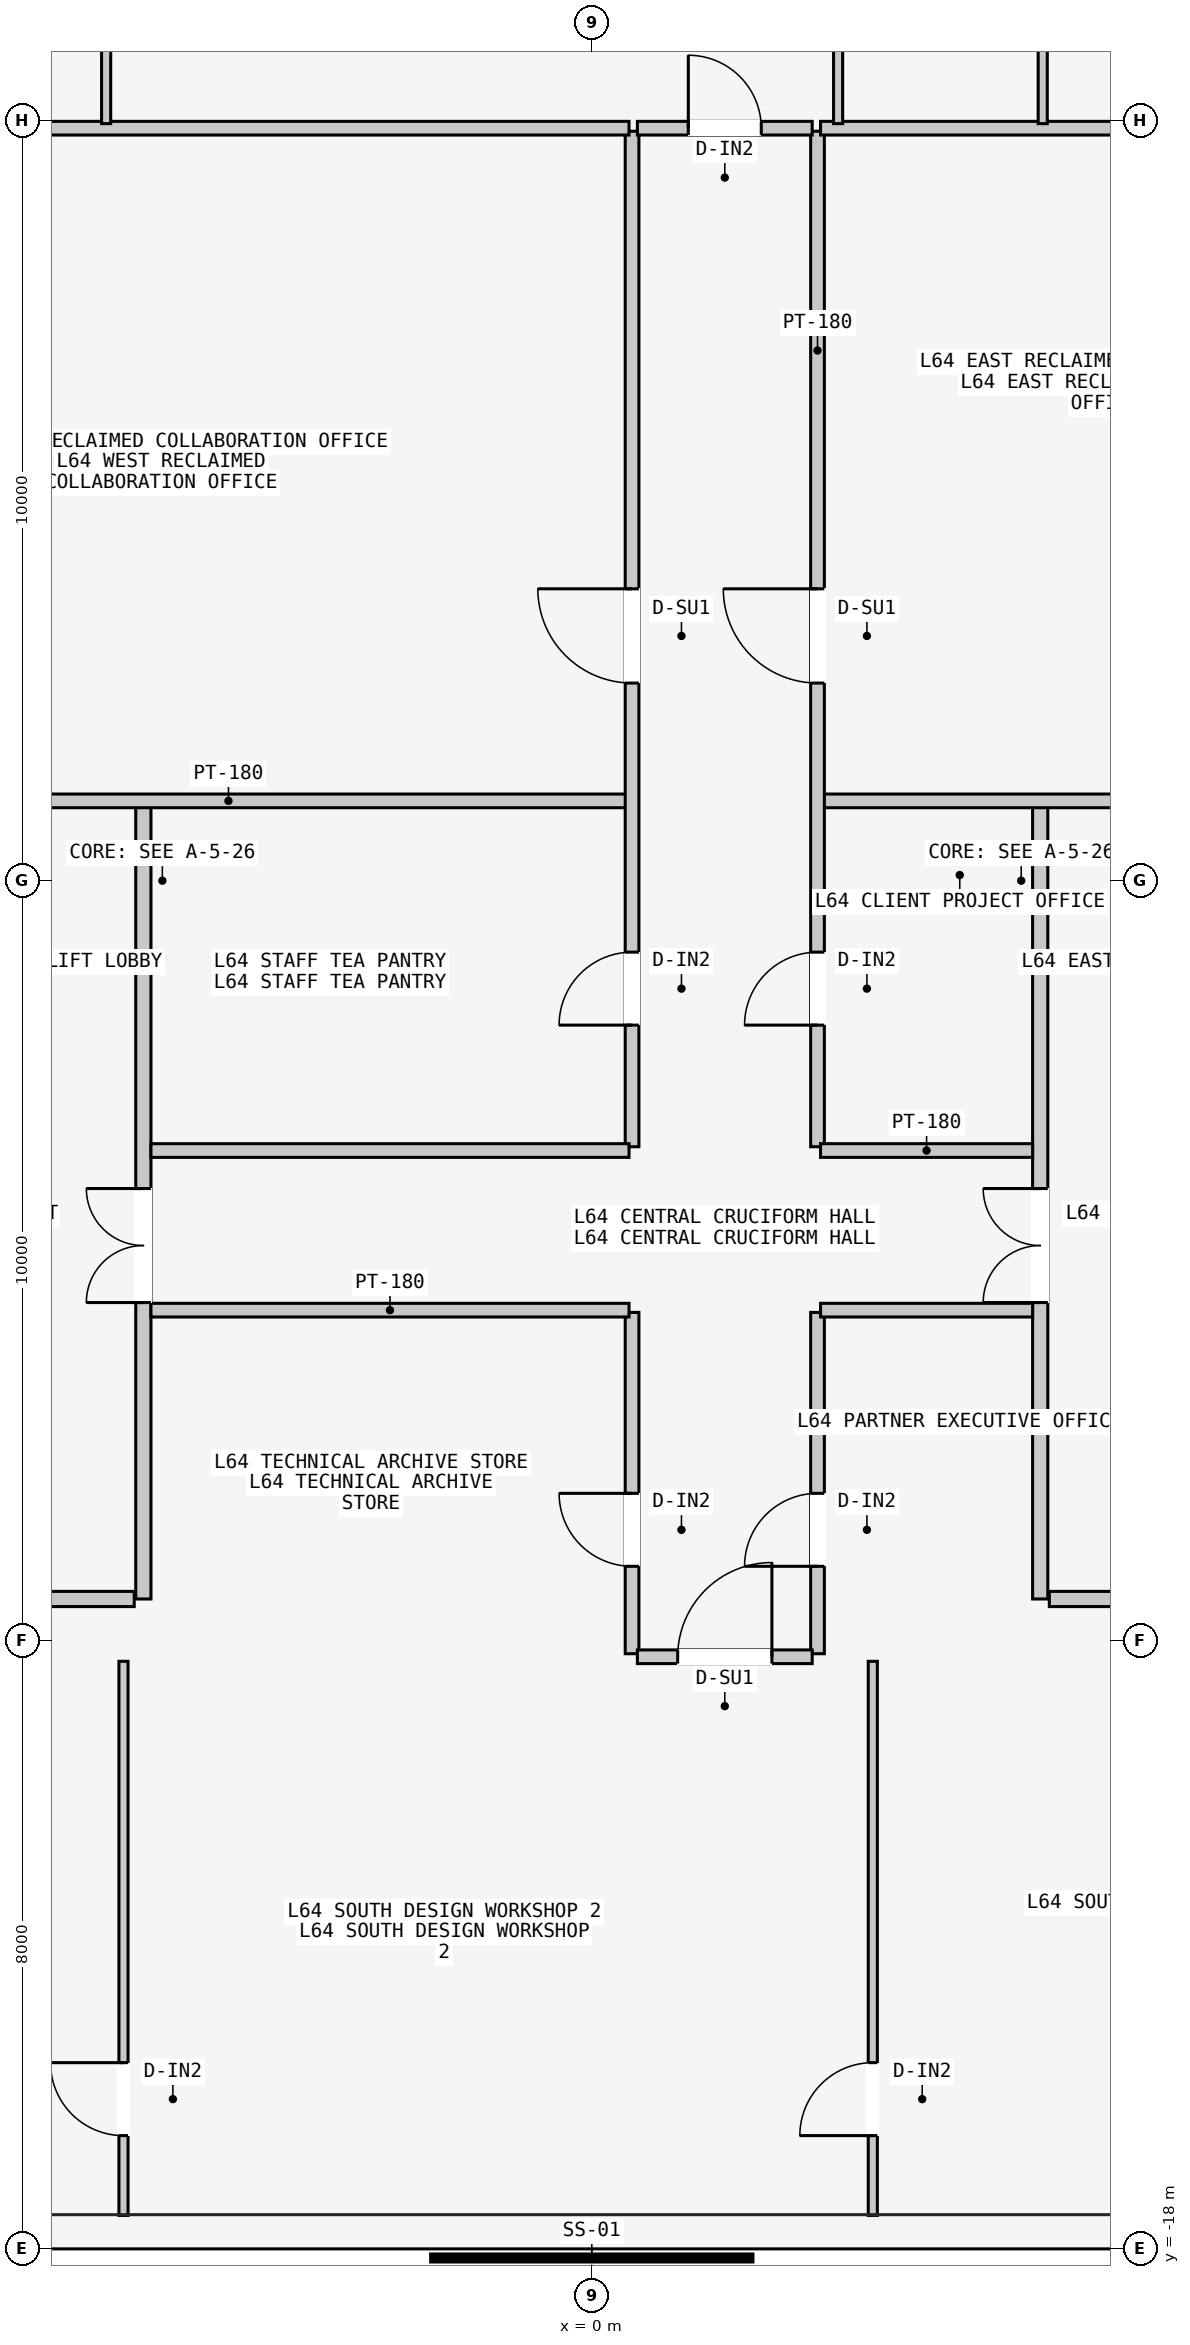
"""IFC4 building model, lengths in metres.
Left out: names, types, materials, properties, quantities, classifications, styles, units other than length and angle.
Written with IfcOpenShell. Run it as: python <this file> out.ifc"""

import sys

from ifc_helpers import new_model, si_unit, direction, frame, frame_2d, origin, place, context, subcontext, project, spatial, rectangle, extrude, element, fill, save


model = new_model("IFC4")
c1 = context("Model", 3, precision=1e-05, world=origin(), true_north=direction((0.0, 1.0)))
c2 = subcontext(c1, "Body", "Model", "MODEL_VIEW")
j1 = project(units=[si_unit("LENGTHUNIT", "METRE"), si_unit("PLANEANGLEUNIT", "RADIAN")], contexts=[c1])
p1 = place(None, origin())
s1 = spatial("IfcSite", under=j1, at=p1, CompositionType="ELEMENT")
p2 = place(p1, origin())
s2 = spatial("IfcBuilding", under=s1, at=p2, CompositionType="ELEMENT")
p3 = place(p2, frame((0.0, 0.0, 243.6)))
s3 = spatial("IfcBuildingStorey", under=s2, at=p3, CompositionType="ELEMENT", Elevation=243.6)
p4 = place(p3, frame((-5.9, -9.45, 0.0), z_axis=(0.0, 0.0, 1.0), x_axis=(0.0, 1.0, 0.0)))
e1 = element("IfcWall", 1, at=p4, inside=s3, PredefinedType="PARTITIONING", context=c2, shape_type="SweptSolid", body=[
    extrude(rectangle(XDim=10.5, YDim=0.2, at=frame_2d((5.25, 0.0))), origin(), (0.0, 0.0, 1.0), 3.4),
])
p5 = place(p4, frame((3.9, 0.0, 0.0)))
e2 = element("IfcOpeningElement", 2, at=p5, cuts=e1, PredefinedType="OPENING", context=c2, shape_type="SweptSolid", body=[
    extrude(rectangle(XDim=1.5, YDim=2.2, at=frame_2d((0.75, 1.1))), frame((0.0, 0.11, 0.0), z_axis=(0.0, -1.0, 0.0), x_axis=(1.0, 0.0, 0.0)), (0.0, 0.0, 1.0), 0.22),
])
p6 = place(p3, frame((-6.02, -9.45, 0.0), z_axis=(0.0, 0.0, 1.0), x_axis=(-1.0, 0.0, 0.0)))
e3 = element("IfcWall", 3, at=p6, inside=s3, PredefinedType="PARTITIONING", context=c2, shape_type="SweptSolid", body=[
    extrude(rectangle(XDim=1.8, YDim=0.2, at=frame_2d((0.9, 0.0))), origin(), (0.0, 0.0, 1.0), 3.4),
])
p7 = place(p3, frame((5.9, -9.45, 0.0), z_axis=(0.0, 0.0, 1.0), x_axis=(0.0, 1.0, 0.0)))
e4 = element("IfcWall", 4, at=p7, inside=s3, PredefinedType="PARTITIONING", context=c2, shape_type="SweptSolid", body=[
    extrude(rectangle(XDim=10.5, YDim=0.2, at=frame_2d((5.25, 0.0))), origin(), (0.0, 0.0, 1.0), 3.4),
])
p8 = place(p7, frame((3.9, 0.0, 0.0)))
e5 = element("IfcOpeningElement", 5, at=p8, cuts=e4, PredefinedType="OPENING", context=c2, shape_type="SweptSolid", body=[
    extrude(rectangle(XDim=1.5, YDim=2.2, at=frame_2d((0.75, 1.1))), frame((0.0, 0.11, 0.0), z_axis=(0.0, -1.0, 0.0), x_axis=(1.0, 0.0, 0.0)), (0.0, 0.0, 1.0), 0.22),
])
p9 = place(p3, frame((6.02, -9.45, 0.0), z_axis=(0.0, 0.0, 1.0), x_axis=(1.0, 0.0, 0.0)))
e6 = element("IfcWall", 6, at=p9, inside=s3, PredefinedType="PARTITIONING", context=c2, shape_type="SweptSolid", body=[
    extrude(rectangle(XDim=1.8, YDim=0.2, at=frame_2d((0.9, 0.0))), origin(), (0.0, 0.0, 1.0), 3.4),
])
p10 = place(p3, frame((-10.05, 1.05, 0.0), z_axis=(0.0, 0.0, 1.0), x_axis=(1.0, 0.0, 0.0)))
e7 = element("IfcWall", 7, at=p10, inside=s3, PredefinedType="PARTITIONING", context=c2, shape_type="SweptSolid", body=[
    extrude(rectangle(XDim=10.54, YDim=0.18, at=frame_2d((5.27, 0.0))), origin(), (0.0, 0.0, 1.0), 3.4),
])
p11 = place(p3, frame((0.53, -3.5, 0.0), z_axis=(0.0, 0.0, 1.0), x_axis=(0.0, 1.0, 0.0)))
e8 = element("IfcWall", 8, at=p11, inside=s3, PredefinedType="PARTITIONING", context=c2, shape_type="SweptSolid", body=[
    extrude(rectangle(XDim=13.36, YDim=0.18, at=frame_2d((6.68, 0.0))), origin(), (0.0, 0.0, 1.0), 3.4),
])
p12 = place(p11, frame((6.1, 0.0, 0.0)))
e9 = element("IfcOpeningElement", 9, at=p12, cuts=e8, PredefinedType="OPENING", context=c2, shape_type="SweptSolid", body=[
    extrude(rectangle(XDim=1.24, YDim=2.24, at=frame_2d((0.62, 1.12))), frame((0.0, 0.1, 0.0), z_axis=(0.0, -1.0, 0.0), x_axis=(1.0, 0.0, 0.0)), (0.0, 0.0, 1.0), 0.2),
])
p13 = place(p11, frame((1.6, 0.0, 0.0)))
e10 = element("IfcOpeningElement", 10, at=p13, cuts=e8, PredefinedType="OPENING", context=c2, shape_type="SweptSolid", body=[
    extrude(rectangle(XDim=0.96, YDim=2.18, at=frame_2d((0.48, 1.09))), frame((0.0, 0.1, 0.0), z_axis=(0.0, -1.0, 0.0), x_axis=(1.0, 0.0, 0.0)), (0.0, 0.0, 1.0), 0.2),
])
p14 = place(p3, frame((-7.5, 9.9, 0.0), z_axis=(0.0, 0.0, 1.0), x_axis=(1.0, 0.0, 0.0)))
e11 = element("IfcWall", 11, at=p14, inside=s3, PredefinedType="PARTITIONING", context=c2, shape_type="SweptSolid", body=[
    extrude(rectangle(XDim=7.99, YDim=0.18, at=frame_2d((3.995, 0.0))), origin(), (0.0, 0.0, 1.0), 3.4),
])
p15 = place(p3, frame((-5.8, -3.55, 0.0), z_axis=(0.0, 0.0, 1.0), x_axis=(1.0, 0.0, 0.0)))
e12 = element("IfcWall", 12, at=p15, inside=s3, PredefinedType="PARTITIONING", context=c2, shape_type="SweptSolid", body=[
    extrude(rectangle(XDim=6.29, YDim=0.18, at=frame_2d((3.145, 0.0))), origin(), (0.0, 0.0, 1.0), 3.4),
])
p16 = place(p3, frame((3.01, 1.05, 0.0), z_axis=(0.0, 0.0, 1.0), x_axis=(1.0, 0.0, 0.0)))
e13 = element("IfcWall", 13, at=p16, inside=s3, PredefinedType="PARTITIONING", context=c2, shape_type="SweptSolid", body=[
    extrude(rectangle(XDim=7.05, YDim=0.18, at=frame_2d((3.525, 0.0))), origin(), (0.0, 0.0, 1.0), 3.4),
])
p17 = place(p3, frame((2.97, -3.5, 0.0), z_axis=(0.0, 0.0, 1.0), x_axis=(0.0, 1.0, 0.0)))
e14 = element("IfcWall", 14, at=p17, inside=s3, PredefinedType="PARTITIONING", context=c2, shape_type="SweptSolid", body=[
    extrude(rectangle(XDim=13.36, YDim=0.18, at=frame_2d((6.68, 0.0))), origin(), (0.0, 0.0, 1.0), 3.4),
])
p18 = place(p17, frame((6.1, 0.0, 0.0)))
e15 = element("IfcOpeningElement", 15, at=p18, cuts=e14, PredefinedType="OPENING", context=c2, shape_type="SweptSolid", body=[
    extrude(rectangle(XDim=1.24, YDim=2.24, at=frame_2d((0.62, 1.12))), frame((0.0, 0.1, 0.0), z_axis=(0.0, -1.0, 0.0), x_axis=(1.0, 0.0, 0.0)), (0.0, 0.0, 1.0), 0.2),
])
p19 = place(p17, frame((1.6, 0.0, 0.0)))
e16 = element("IfcOpeningElement", 16, at=p19, cuts=e14, PredefinedType="OPENING", context=c2, shape_type="SweptSolid", body=[
    extrude(rectangle(XDim=0.96, YDim=2.18, at=frame_2d((0.48, 1.09))), frame((0.0, 0.1, 0.0), z_axis=(0.0, -1.0, 0.0), x_axis=(1.0, 0.0, 0.0)), (0.0, 0.0, 1.0), 0.2),
])
p20 = place(p3, frame((3.01, 9.9, 0.0), z_axis=(0.0, 0.0, 1.0), x_axis=(1.0, 0.0, 0.0)))
e17 = element("IfcWall", 17, at=p20, inside=s3, PredefinedType="PARTITIONING", context=c2, shape_type="SweptSolid", body=[
    extrude(rectangle(XDim=4.49, YDim=0.18, at=frame_2d((2.245, 0.0))), origin(), (0.0, 0.0, 1.0), 3.4),
])
p21 = place(p3, frame((3.01, -3.55, 0.0), z_axis=(0.0, 0.0, 1.0), x_axis=(1.0, 0.0, 0.0)))
e18 = element("IfcWall", 18, at=p21, inside=s3, PredefinedType="PARTITIONING", context=c2, shape_type="SweptSolid", body=[
    extrude(rectangle(XDim=2.79, YDim=0.18, at=frame_2d((1.395, 0.0))), origin(), (0.0, 0.0, 1.0), 3.4),
])
p22 = place(p3, frame((0.53, -10.17, 0.0), z_axis=(0.0, 0.0, 1.0), x_axis=(0.0, 1.0, 0.0)))
e19 = element("IfcWall", 19, at=p22, inside=s3, PredefinedType="PARTITIONING", context=c2, shape_type="SweptSolid", body=[
    extrude(rectangle(XDim=4.49, YDim=0.18, at=frame_2d((2.245, 0.0))), origin(), (0.0, 0.0, 1.0), 3.4),
])
p23 = place(p22, frame((1.15, 0.0, 0.0)))
e20 = element("IfcOpeningElement", 20, at=p23, cuts=e19, PredefinedType="OPENING", context=c2, shape_type="SweptSolid", body=[
    extrude(rectangle(XDim=0.96, YDim=2.18, at=frame_2d((0.48, 1.09))), frame((0.0, 0.1, 0.0), z_axis=(0.0, -1.0, 0.0), x_axis=(1.0, 0.0, 0.0)), (0.0, 0.0, 1.0), 0.2),
])
p24 = place(p3, frame((2.97, -10.17, 0.0), z_axis=(0.0, 0.0, 1.0), x_axis=(0.0, 1.0, 0.0)))
e21 = element("IfcWall", 21, at=p24, inside=s3, PredefinedType="PARTITIONING", context=c2, shape_type="SweptSolid", body=[
    extrude(rectangle(XDim=4.49, YDim=0.18, at=frame_2d((2.245, 0.0))), origin(), (0.0, 0.0, 1.0), 3.4),
])
p25 = place(p24, frame((1.15, 0.0, 0.0)))
e22 = element("IfcOpeningElement", 22, at=p25, cuts=e21, PredefinedType="OPENING", context=c2, shape_type="SweptSolid", body=[
    extrude(rectangle(XDim=0.96, YDim=2.18, at=frame_2d((0.48, 1.09))), frame((0.0, 0.1, 0.0), z_axis=(0.0, -1.0, 0.0), x_axis=(1.0, 0.0, 0.0)), (0.0, 0.0, 1.0), 0.2),
])
p26 = place(p3, frame((-5.8, -5.65, 0.0), z_axis=(0.0, 0.0, 1.0), x_axis=(1.0, 0.0, 0.0)))
e23 = element("IfcWall", 23, at=p26, inside=s3, PredefinedType="PARTITIONING", context=c2, shape_type="SweptSolid", body=[
    extrude(rectangle(XDim=6.29, YDim=0.18, at=frame_2d((3.145, 0.0))), origin(), (0.0, 0.0, 1.0), 3.4),
])
p27 = place(p3, frame((3.01, -5.65, 0.0), z_axis=(0.0, 0.0, 1.0), x_axis=(1.0, 0.0, 0.0)))
e24 = element("IfcWall", 24, at=p27, inside=s3, PredefinedType="PARTITIONING", context=c2, shape_type="SweptSolid", body=[
    extrude(rectangle(XDim=2.79, YDim=0.18, at=frame_2d((1.395, 0.0))), origin(), (0.0, 0.0, 1.0), 3.4),
])
p28 = place(p3, frame((-6.39, 9.96, 0.0), z_axis=(0.0, 0.0, 1.0), x_axis=(0.0, 1.0, 0.0)))
e25 = element("IfcWall", 25, at=p28, inside=s3, PredefinedType="PARTITIONING", context=c2, shape_type="SweptSolid", body=[
    extrude(rectangle(XDim=7.6, YDim=0.12, at=frame_2d((3.8, 0.0))), origin(), (0.0, 0.0, 1.0), 3.4),
])
p29 = place(p28, frame((1.15, 0.0, 0.0)))
e26 = element("IfcOpeningElement", 26, at=p29, cuts=e25, PredefinedType="OPENING", context=c2, shape_type="SweptSolid", body=[
    extrude(rectangle(XDim=0.96, YDim=2.18, at=frame_2d((0.48, 1.09))), frame((0.0, 0.07, 0.0), z_axis=(0.0, -1.0, 0.0), x_axis=(1.0, 0.0, 0.0)), (0.0, 0.0, 1.0), 0.14),
])
p30 = place(p3, frame((3.241, 9.96, 0.0), z_axis=(0.0, 0.0, 1.0), x_axis=(0.0, 1.0, 0.0)))
e27 = element("IfcWall", 27, at=p30, inside=s3, PredefinedType="PARTITIONING", context=c2, shape_type="SweptSolid", body=[
    extrude(rectangle(XDim=7.6, YDim=0.12, at=frame_2d((3.8, 0.0))), origin(), (0.0, 0.0, 1.0), 3.4),
])
p31 = place(p30, frame((1.15, 0.0, 0.0)))
e28 = element("IfcOpeningElement", 28, at=p31, cuts=e27, PredefinedType="OPENING", context=c2, shape_type="SweptSolid", body=[
    extrude(rectangle(XDim=0.96, YDim=2.18, at=frame_2d((0.48, 1.09))), frame((0.0, 0.07, 0.0), z_axis=(0.0, -1.0, 0.0), x_axis=(1.0, 0.0, 0.0)), (0.0, 0.0, 1.0), 0.14),
])
p32 = place(p3, frame((5.933, 9.96, 0.0), z_axis=(0.0, 0.0, 1.0), x_axis=(0.0, 1.0, 0.0)))
e29 = element("IfcWall", 29, at=p32, inside=s3, PredefinedType="PARTITIONING", context=c2, shape_type="SweptSolid", body=[
    extrude(rectangle(XDim=7.6, YDim=0.12, at=frame_2d((3.8, 0.0))), origin(), (0.0, 0.0, 1.0), 3.4),
])
p33 = place(p32, frame((1.15, 0.0, 0.0)))
e30 = element("IfcOpeningElement", 30, at=p33, cuts=e29, PredefinedType="OPENING", context=c2, shape_type="SweptSolid", body=[
    extrude(rectangle(XDim=0.96, YDim=2.18, at=frame_2d((0.48, 1.09))), frame((0.0, 0.07, 0.0), z_axis=(0.0, -1.0, 0.0), x_axis=(1.0, 0.0, 0.0)), (0.0, 0.0, 1.0), 0.14),
])
p34 = place(p3, frame((0.6, 9.9, 0.0), z_axis=(0.0, 0.0, 1.0), x_axis=(1.0, 0.0, 0.0)))
e31 = element("IfcWall", 31, at=p34, inside=s3, PredefinedType="PARTITIONING", context=c2, shape_type="SweptSolid", body=[
    extrude(rectangle(XDim=2.3, YDim=0.18, at=frame_2d((1.15, 0.0))), origin(), (0.0, 0.0, 1.0), 3.4),
])
p35 = place(p34, frame((0.67, 0.0, 0.0)))
e32 = element("IfcOpeningElement", 32, at=p35, cuts=e31, PredefinedType="OPENING", context=c2, shape_type="SweptSolid", body=[
    extrude(rectangle(XDim=0.96, YDim=2.18, at=frame_2d((0.48, 1.09))), frame((0.0, 0.1, 0.0), z_axis=(0.0, -1.0, 0.0), x_axis=(1.0, 0.0, 0.0)), (0.0, 0.0, 1.0), 0.2),
])
p36 = place(p3, frame((-6.161, -17.56, 0.0), z_axis=(0.0, 0.0, 1.0), x_axis=(0.0, 1.0, 0.0)))
e33 = element("IfcWall", 33, at=p36, inside=s3, PredefinedType="PARTITIONING", context=c2, shape_type="SweptSolid", body=[
    extrude(rectangle(XDim=7.29, YDim=0.12, at=frame_2d((3.645, 0.0))), origin(), (0.0, 0.0, 1.0), 3.4),
])
p37 = place(p36, frame((1.05, 0.0, 0.0)))
e34 = element("IfcOpeningElement", 34, at=p37, cuts=e33, PredefinedType="OPENING", context=c2, shape_type="SweptSolid", body=[
    extrude(rectangle(XDim=0.96, YDim=2.18, at=frame_2d((0.48, 1.09))), frame((0.0, 0.07, 0.0), z_axis=(0.0, -1.0, 0.0), x_axis=(1.0, 0.0, 0.0)), (0.0, 0.0, 1.0), 0.14),
])
p38 = place(p3, frame((3.698, -17.56, 0.0), z_axis=(0.0, 0.0, 1.0), x_axis=(0.0, 1.0, 0.0)))
e35 = element("IfcWall", 35, at=p38, inside=s3, PredefinedType="PARTITIONING", context=c2, shape_type="SweptSolid", body=[
    extrude(rectangle(XDim=7.29, YDim=0.12, at=frame_2d((3.645, 0.0))), origin(), (0.0, 0.0, 1.0), 3.4),
])
p39 = place(p38, frame((1.05, 0.0, 0.0)))
e36 = element("IfcOpeningElement", 36, at=p39, cuts=e35, PredefinedType="OPENING", context=c2, shape_type="SweptSolid", body=[
    extrude(rectangle(XDim=0.96, YDim=2.18, at=frame_2d((0.48, 1.09))), frame((0.0, 0.07, 0.0), z_axis=(0.0, -1.0, 0.0), x_axis=(1.0, 0.0, 0.0)), (0.0, 0.0, 1.0), 0.14),
])
p40 = place(p3, frame((0.6, -10.21, 0.0), z_axis=(0.0, 0.0, 1.0), x_axis=(1.0, 0.0, 0.0)))
e37 = element("IfcWall", 37, at=p40, inside=s3, PredefinedType="PARTITIONING", context=c2, shape_type="SweptSolid", body=[
    extrude(rectangle(XDim=2.3, YDim=0.18, at=frame_2d((1.15, 0.0))), origin(), (0.0, 0.0, 1.0), 3.4),
])
p41 = place(p40, frame((0.53, 0.0, 0.0)))
e38 = element("IfcOpeningElement", 38, at=p41, cuts=e37, PredefinedType="OPENING", context=c2, shape_type="SweptSolid", body=[
    extrude(rectangle(XDim=1.24, YDim=2.24, at=frame_2d((0.62, 1.12))), frame((0.0, 0.1, 0.0), z_axis=(0.0, -1.0, 0.0), x_axis=(1.0, 0.0, 0.0)), (0.0, 0.0, 1.0), 0.2),
])
p42 = place(p5, origin())
e39 = element("IfcDoor", 39, at=p42, inside=s3, OperationType="DOUBLE_DOOR_SINGLE_SWING", PredefinedType="DOOR", context=c2, shape_type="SweptSolid", body=[
    extrude(rectangle(XDim=1.5, YDim=2.2, at=frame_2d((0.75, 1.1))), frame((0.0, 0.025, 0.0), z_axis=(0.0, -1.0, 0.0), x_axis=(1.0, 0.0, 0.0)), (0.0, 0.0, 1.0), 0.05),
])
fill(e2, e39)
p43 = place(p8, origin())
e40 = element("IfcDoor", 40, at=p43, inside=s3, OperationType="DOUBLE_DOOR_SINGLE_SWING", PredefinedType="DOOR", context=c2, shape_type="SweptSolid", body=[
    extrude(rectangle(XDim=1.5, YDim=2.2, at=frame_2d((0.75, 1.1))), frame((0.0, 0.025, 0.0), z_axis=(0.0, -1.0, 0.0), x_axis=(1.0, 0.0, 0.0)), (0.0, 0.0, 1.0), 0.05),
])
fill(e5, e40)
p44 = place(p12, origin())
e41 = element("IfcDoor", 41, at=p44, inside=s3, OperationType="SINGLE_SWING_RIGHT", PredefinedType="DOOR", context=c2, shape_type="SweptSolid", body=[
    extrude(rectangle(XDim=1.24, YDim=2.24, at=frame_2d((0.62, 1.12))), frame((0.0, 0.025, 0.0), z_axis=(0.0, -1.0, 0.0), x_axis=(1.0, 0.0, 0.0)), (0.0, 0.0, 1.0), 0.05),
])
fill(e9, e41)
p45 = place(p13, origin())
e42 = element("IfcDoor", 42, at=p45, inside=s3, OperationType="SINGLE_SWING_LEFT", PredefinedType="DOOR", context=c2, shape_type="SweptSolid", body=[
    extrude(rectangle(XDim=0.96, YDim=2.18, at=frame_2d((0.48, 1.09))), frame((0.0, 0.025, 0.0), z_axis=(0.0, -1.0, 0.0), x_axis=(1.0, 0.0, 0.0)), (0.0, 0.0, 1.0), 0.05),
])
fill(e10, e42)
p46 = place(p18, origin())
e43 = element("IfcDoor", 43, at=p46, inside=s3, OperationType="SINGLE_SWING_RIGHT", PredefinedType="DOOR", context=c2, shape_type="SweptSolid", body=[
    extrude(rectangle(XDim=1.24, YDim=2.24, at=frame_2d((0.62, 1.12))), frame((0.0, 0.025, 0.0), z_axis=(0.0, -1.0, 0.0), x_axis=(1.0, 0.0, 0.0)), (0.0, 0.0, 1.0), 0.05),
])
fill(e15, e43)
p47 = place(p19, origin())
e44 = element("IfcDoor", 44, at=p47, inside=s3, OperationType="SINGLE_SWING_LEFT", PredefinedType="DOOR", context=c2, shape_type="SweptSolid", body=[
    extrude(rectangle(XDim=0.96, YDim=2.18, at=frame_2d((0.48, 1.09))), frame((0.0, 0.025, 0.0), z_axis=(0.0, -1.0, 0.0), x_axis=(1.0, 0.0, 0.0)), (0.0, 0.0, 1.0), 0.05),
])
fill(e16, e44)
p48 = place(p23, origin())
e45 = element("IfcDoor", 45, at=p48, inside=s3, OperationType="SINGLE_SWING_RIGHT", PredefinedType="DOOR", context=c2, shape_type="SweptSolid", body=[
    extrude(rectangle(XDim=0.96, YDim=2.18, at=frame_2d((0.48, 1.09))), frame((0.0, 0.025, 0.0), z_axis=(0.0, -1.0, 0.0), x_axis=(1.0, 0.0, 0.0)), (0.0, 0.0, 1.0), 0.05),
])
fill(e20, e45)
p49 = place(p25, origin())
e46 = element("IfcDoor", 46, at=p49, inside=s3, OperationType="SINGLE_SWING_LEFT", PredefinedType="DOOR", context=c2, shape_type="SweptSolid", body=[
    extrude(rectangle(XDim=0.96, YDim=2.18, at=frame_2d((0.48, 1.09))), frame((0.0, 0.025, 0.0), z_axis=(0.0, -1.0, 0.0), x_axis=(1.0, 0.0, 0.0)), (0.0, 0.0, 1.0), 0.05),
])
fill(e22, e46)
p50 = place(p35, origin())
e47 = element("IfcDoor", 47, at=p50, inside=s3, OperationType="SINGLE_SWING_LEFT", PredefinedType="DOOR", context=c2, shape_type="SweptSolid", body=[
    extrude(rectangle(XDim=0.96, YDim=2.18, at=frame_2d((0.48, 1.09))), frame((0.0, 0.025, 0.0), z_axis=(0.0, -1.0, 0.0), x_axis=(1.0, 0.0, 0.0)), (0.0, 0.0, 1.0), 0.05),
])
fill(e32, e47)
p51 = place(p37, origin())
e48 = element("IfcDoor", 48, at=p51, inside=s3, OperationType="SINGLE_SWING_RIGHT", PredefinedType="DOOR", context=c2, shape_type="SweptSolid", body=[
    extrude(rectangle(XDim=0.96, YDim=2.18, at=frame_2d((0.48, 1.09))), frame((0.0, 0.025, 0.0), z_axis=(0.0, -1.0, 0.0), x_axis=(1.0, 0.0, 0.0)), (0.0, 0.0, 1.0), 0.05),
])
fill(e34, e48)
p52 = place(p39, origin())
e49 = element("IfcDoor", 49, at=p52, inside=s3, OperationType="SINGLE_SWING_LEFT", PredefinedType="DOOR", context=c2, shape_type="SweptSolid", body=[
    extrude(rectangle(XDim=0.96, YDim=2.18, at=frame_2d((0.48, 1.09))), frame((0.0, 0.025, 0.0), z_axis=(0.0, -1.0, 0.0), x_axis=(1.0, 0.0, 0.0)), (0.0, 0.0, 1.0), 0.05),
])
fill(e36, e49)
p53 = place(p41, origin())
e50 = element("IfcDoor", 50, at=p53, inside=s3, OperationType="SINGLE_SWING_RIGHT", PredefinedType="DOOR", context=c2, shape_type="SweptSolid", body=[
    extrude(rectangle(XDim=1.24, YDim=2.24, at=frame_2d((0.62, 1.12))), frame((0.0, 0.025, 0.0), z_axis=(0.0, -1.0, 0.0), x_axis=(1.0, 0.0, 0.0)), (0.0, 0.0, 1.0), 0.05),
])
fill(e38, e50)
save(model, sys.argv[1])
